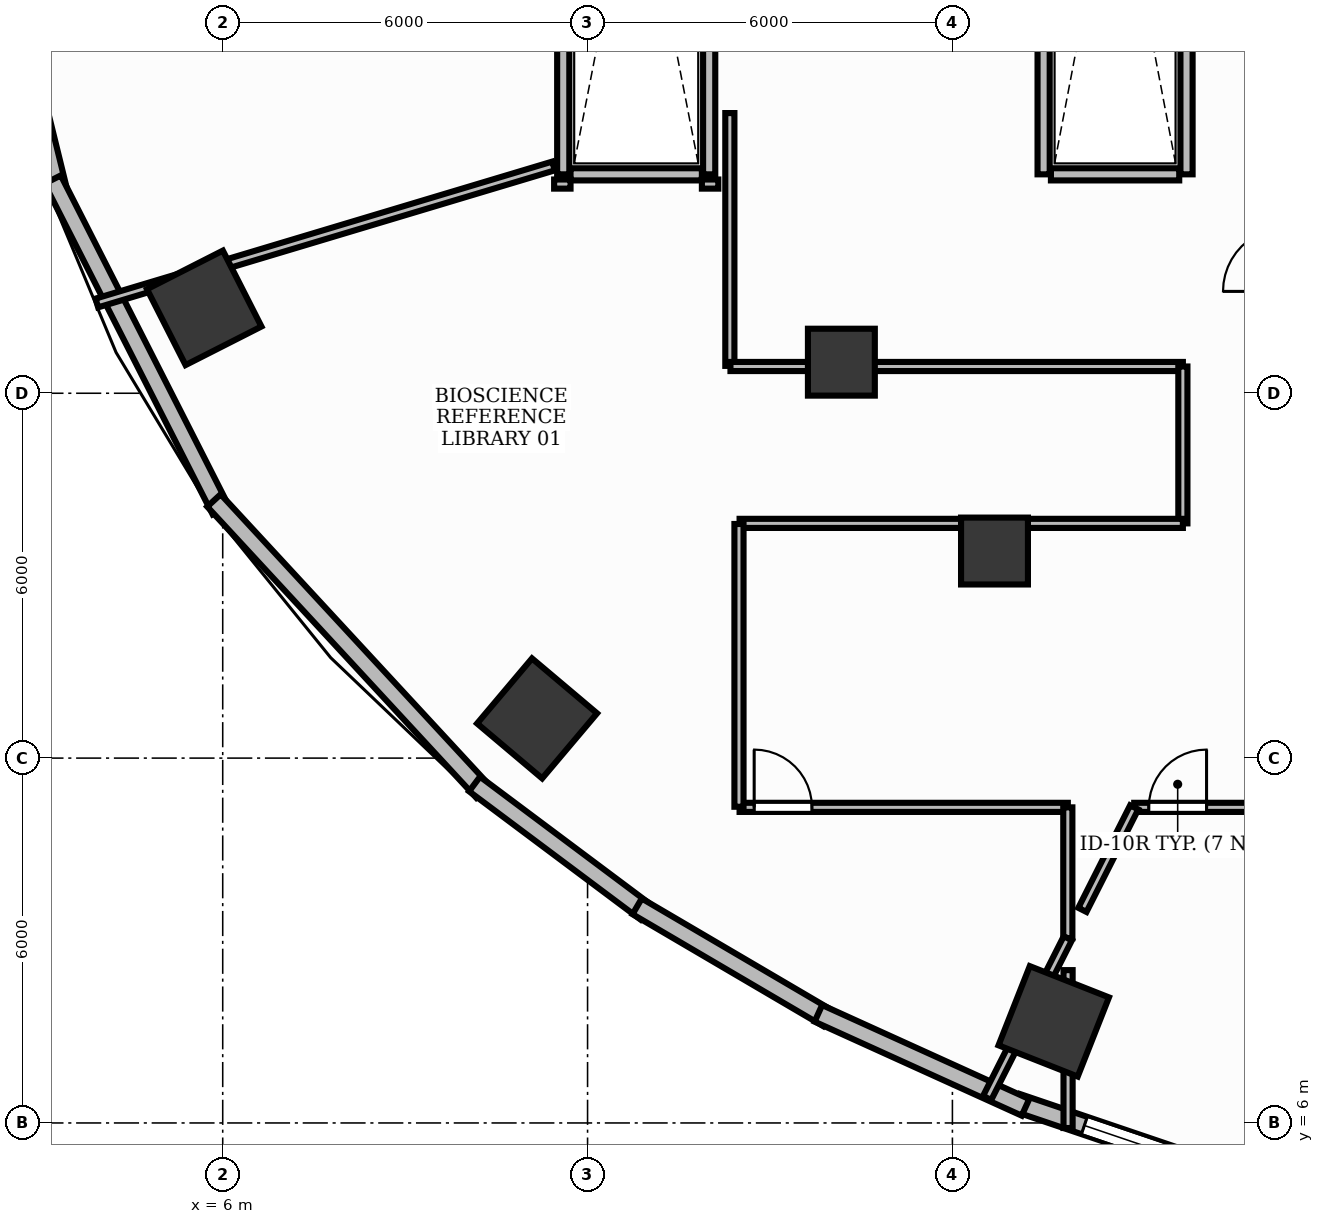
"""IFC4 building model, lengths in metres.
Left out: names, types, materials, properties, quantities, classifications, styles, units other than length and angle.
Written with IfcOpenShell. Run it as: python <this file> out.ifc"""

import sys

from ifc_helpers import new_model, si_unit, direction, frame, frame_2d, origin, origin_2d, place, context, subcontext, project, spatial, rectangle, extrude, element, fill, save


model = new_model("IFC4")
c1 = context("Model", 3, precision=1e-05, world=origin(), true_north=direction((0.0, 1.0)))
c2 = subcontext(c1, "Body", "Model", "MODEL_VIEW")
j1 = project(units=[si_unit("LENGTHUNIT", "METRE"), si_unit("PLANEANGLEUNIT", "RADIAN")], contexts=[c1])
p1 = place(None, origin())
s1 = spatial("IfcSite", under=j1, at=p1, CompositionType="ELEMENT")
p2 = place(p1, origin())
s2 = spatial("IfcBuilding", under=s1, at=p2, CompositionType="ELEMENT")
p3 = place(p2, frame((0.0, 0.0, 20.4)))
s3 = spatial("IfcBuildingStorey", under=s2, at=p3, CompositionType="ELEMENT", Elevation=20.4)
p4 = place(p3, frame((5.696, 19.404, -0.0), z_axis=(0.0, 0.0, 1.0), x_axis=(-0.453057191132, 0.891481453292, 0.0)))
e1 = element("IfcColumn", 1, at=p4, inside=s3, PredefinedType="COLUMN", context=c2, shape_type="SweptSolid", body=[
    extrude(rectangle(XDim=1.4, YDim=1.4, at=origin_2d()), origin(), (0.0, 0.0, 1.0), 5.101),
])
p5 = place(p3, frame((16.174, 18.511, -0.0), z_axis=(0.0, 0.0, 1.0), x_axis=(1.0, 0.0, 0.0)))
e2 = element("IfcColumn", 2, at=p5, inside=s3, PredefinedType="COLUMN", context=c2, shape_type="SweptSolid", body=[
    extrude(rectangle(XDim=1.1, YDim=1.1, at=origin_2d()), origin(), (0.0, 0.0, 1.0), 5.101),
])
p6 = place(p3, frame((11.17, 12.653, -0.0), z_axis=(0.0, 0.0, 1.0), x_axis=(-0.764246456939, 0.644924300253, 0.0)))
e3 = element("IfcColumn", 3, at=p6, inside=s3, PredefinedType="COLUMN", context=c2, shape_type="SweptSolid", body=[
    extrude(rectangle(XDim=1.4, YDim=1.4, at=origin_2d()), origin(), (0.0, 0.0, 1.0), 5.101),
])
p7 = place(p3, frame((18.692, 15.405, -0.0), z_axis=(0.0, 0.0, 1.0), x_axis=(1.0, 0.0, 0.0)))
e4 = element("IfcColumn", 4, at=p7, inside=s3, PredefinedType="COLUMN", context=c2, shape_type="SweptSolid", body=[
    extrude(rectangle(XDim=1.1, YDim=1.1, at=origin_2d()), origin(), (0.0, 0.0, 1.0), 5.101),
])
p8 = place(p3, frame((19.667, 7.671, -0.0), z_axis=(0.0, 0.0, 1.0), x_axis=(-0.930225540858, 0.366988341962, 0.0)))
e5 = element("IfcColumn", 5, at=p8, inside=s3, PredefinedType="COLUMN", context=c2, shape_type="SweptSolid", body=[
    extrude(rectangle(XDim=1.4, YDim=1.4, at=origin_2d()), origin(), (0.0, 0.0, 1.0), 5.101),
])
p9 = place(p3, frame((2.571, 24.266, 0.0), z_axis=(0.0, 0.0, 1.0), x_axis=(0.238522035896, -0.971137085273, 0.0)))
e6 = element("IfcWall", 6, at=p9, inside=s3, PredefinedType="STANDARD", context=c2, shape_type="SweptSolid", body=[
    extrude(rectangle(XDim=2.993, YDim=0.3, at=frame_2d((1.497, 0.0))), origin(), (0.0, 0.0, 1.0), 5.1),
])
p10 = place(p3, frame((19.065, 6.333, 0.0), z_axis=(0.0, 0.0, 1.0), x_axis=(0.947034337234, -0.321132315564, 0.0)))
e7 = element("IfcWall", 7, at=p10, inside=s3, PredefinedType="STANDARD", context=c2, shape_type="SweptSolid", body=[
    extrude(rectangle(XDim=3.79, YDim=0.3, at=frame_2d((1.895, 0.0))), origin(), (0.0, 0.0, 1.0), 4.67),
])
p11 = place(p10, frame((1.166, 0.0, 1.5)))
e8 = element("IfcOpeningElement", 8, at=p11, cuts=e7, PredefinedType="OPENING", context=c2, shape_type="SweptSolid", body=[
    extrude(rectangle(XDim=2.4, YDim=1.2, at=frame_2d((1.2, 0.6))), frame((0.0, 0.165, 0.0), z_axis=(0.0, -1.0, 0.0), x_axis=(1.0, 0.0, 0.0)), (0.0, 0.0, 1.0), 0.33),
])
p12 = place(p3, frame((3.204, 21.514, 0.0), z_axis=(0.0, 0.0, 1.0), x_axis=(0.453093111502, -0.891463197395, 0.0)))
e9 = element("IfcWall", 9, at=p12, inside=s3, PredefinedType="STANDARD", context=c2, shape_type="SweptSolid", body=[
    extrude(rectangle(XDim=6.102, YDim=0.3, at=frame_2d((3.051, 0.0))), origin(), (0.0, 0.0, 1.0), 5.1),
])
p13 = place(p3, frame((5.856, 16.236, 0.0), z_axis=(0.0, 0.0, 1.0), x_axis=(0.678724966684, -0.734392551433, 0.0)))
e10 = element("IfcWall", 10, at=p13, inside=s3, PredefinedType="STANDARD", context=c2, shape_type="SweptSolid", body=[
    extrude(rectangle(XDim=6.517, YDim=0.3, at=frame_2d((3.259, 0.0))), origin(), (0.0, 0.0, 1.0), 5.1),
])
p14 = place(p3, frame((10.142, 11.573, 0.0), z_axis=(0.0, 0.0, 1.0), x_axis=(0.800823020995, -0.598901067827, 0.0)))
e11 = element("IfcWall", 11, at=p14, inside=s3, PredefinedType="STANDARD", context=c2, shape_type="SweptSolid", body=[
    extrude(rectangle(XDim=3.521, YDim=0.3, at=frame_2d((1.76, 0.0))), origin(), (0.0, 0.0, 1.0), 5.1),
])
p15 = place(p3, frame((12.815, 9.562, 0.0), z_axis=(0.0, 0.0, 1.0), x_axis=(0.8624654944, -0.506115867139, 0.0)))
e12 = element("IfcWall", 12, at=p15, inside=s3, PredefinedType="STANDARD", context=c2, shape_type="SweptSolid", body=[
    extrude(rectangle(XDim=3.635, YDim=0.3, at=frame_2d((1.818, 0.0))), origin(), (0.0, 0.0, 1.0), 5.1),
])
p16 = place(p3, frame((15.796, 7.802, 0.0), z_axis=(0.0, 0.0, 1.0), x_axis=(0.910623406862, -0.413237233166, 0.0)))
e13 = element("IfcWall", 13, at=p16, inside=s3, PredefinedType="STANDARD", context=c2, shape_type="SweptSolid", body=[
    extrude(rectangle(XDim=3.74, YDim=0.3, at=frame_2d((1.87, 0.0))), origin(), (0.0, 0.0, 1.0), 5.1),
])
for number, where, z_axis, x_axis in (
    (14, (11.6, 21.6, 0.0), (0.0, 0.0, 1.0), (0.0, 1.0, 0.0)),
    (15, (14.0, 21.6, 0.0), (0.0, 0.0, 1.0), (0.0, 1.0, 0.0)),
):
    element("IfcWall", number, at=place(p3, frame(where, z_axis=z_axis, x_axis=x_axis)), inside=s3, PredefinedType="PARTITIONING", context=c2, shape_type="SweptSolid", body=[
        extrude(rectangle(XDim=10.8, YDim=0.2, at=frame_2d((5.4, 0.0))), origin(), (0.0, 0.0, 1.0), 4.11),
    ])
p17 = place(p3, frame((11.72, 21.6, 0.0), z_axis=(0.0, 0.0, 1.0), x_axis=(1.0, 0.0, 0.0)))
e16 = element("IfcWall", 16, at=p17, inside=s3, PredefinedType="PARTITIONING", context=c2, shape_type="SweptSolid", body=[
    extrude(rectangle(XDim=2.16, YDim=0.2, at=frame_2d((1.08, 0.0))), origin(), (0.0, 0.0, 1.0), 4.11),
])
for number, where, z_axis, x_axis in (
    (17, (19.5, 21.6, 0.0), (0.0, 0.0, 1.0), (0.0, 1.0, 0.0)),
    (18, (21.85, 21.6, 0.0), (0.0, 0.0, 1.0), (0.0, 1.0, 0.0)),
):
    element("IfcWall", number, at=place(p3, frame(where, z_axis=z_axis, x_axis=x_axis)), inside=s3, PredefinedType="PARTITIONING", context=c2, shape_type="SweptSolid", body=[
        extrude(rectangle(XDim=10.8, YDim=0.2, at=frame_2d((5.4, 0.0))), origin(), (0.0, 0.0, 1.0), 4.11),
    ])
p18 = place(p3, frame((19.62, 21.6, 0.0), z_axis=(0.0, 0.0, 1.0), x_axis=(1.0, 0.0, 0.0)))
e19 = element("IfcWall", 19, at=p18, inside=s3, PredefinedType="PARTITIONING", context=c2, shape_type="SweptSolid", body=[
    extrude(rectangle(XDim=2.11, YDim=0.2, at=frame_2d((1.055, 0.0))), origin(), (0.0, 0.0, 1.0), 4.11),
])
p19 = place(p3, frame((14.5, 11.19, 0.0), z_axis=(0.0, 0.0, 1.0), x_axis=(1.0, 0.0, 0.0)))
e20 = element("IfcWall", 20, at=p19, inside=s3, PredefinedType="PARTITIONING", context=c2, shape_type="SweptSolid", body=[
    extrude(rectangle(XDim=5.398, YDim=0.15, at=frame_2d((2.699, 0.0))), origin(), (0.0, 0.0, 1.0), 4.11),
])
p20 = place(p19, frame((0.24, 0.0, 0.0)))
e21 = element("IfcOpeningElement", 21, at=p20, cuts=e20, PredefinedType="OPENING", context=c2, shape_type="SweptSolid", body=[
    extrude(rectangle(XDim=0.95, YDim=2.15, at=frame_2d((0.475, 1.075))), frame((0.0, 0.09, 0.0), z_axis=(0.0, -1.0, 0.0), x_axis=(1.0, 0.0, 0.0)), (0.0, 0.0, 1.0), 0.18),
])
p21 = place(p3, frame((20.99, 11.19, 0.0), z_axis=(0.0, 0.0, 1.0), x_axis=(1.0, 0.0, 0.0)))
e22 = element("IfcWall", 22, at=p21, inside=s3, PredefinedType="PARTITIONING", context=c2, shape_type="SweptSolid", body=[
    extrude(rectangle(XDim=9.365, YDim=0.15, at=frame_2d((4.683, 0.0))), origin(), (0.0, 0.0, 1.0), 4.11),
])
p22 = place(p21, frame((0.24, 0.0, 0.0)))
e23 = element("IfcOpeningElement", 23, at=p22, cuts=e22, PredefinedType="OPENING", context=c2, shape_type="SweptSolid", body=[
    extrude(rectangle(XDim=0.95, YDim=2.15, at=frame_2d((0.475, 1.075))), frame((0.0, 0.09, 0.0), z_axis=(0.0, -1.0, 0.0), x_axis=(1.0, 0.0, 0.0)), (0.0, 0.0, 1.0), 0.18),
])
p23 = place(p3, frame((3.93, 19.484, 0.0), z_axis=(0.0, 0.0, 1.0), x_axis=(0.957822857275, 0.287359311806, 0.0)))
e24 = element("IfcWall", 24, at=p23, inside=s3, PredefinedType="PARTITIONING", context=c2, shape_type="SweptSolid", body=[
    extrude(rectangle(XDim=7.841, YDim=0.15, at=frame_2d((3.92, 0.0))), origin(), (0.0, 0.0, 1.0), 4.11),
])
for number, where, z_axis, x_axis in (
    (25, (11.45, 21.44, 0.0), (0.0, 0.0, 1.0), (1.0, 0.0, 0.0)),
    (26, (13.88, 21.44, 0.0), (0.0, 0.0, 1.0), (1.0, 0.0, 0.0)),
):
    element("IfcWall", number, at=place(p3, frame(where, z_axis=z_axis, x_axis=x_axis)), inside=s3, PredefinedType="PARTITIONING", context=c2, shape_type="SweptSolid", body=[
        extrude(rectangle(XDim=0.27, YDim=0.15, at=frame_2d((0.135, 0.0))), origin(), (0.0, 0.0, 1.0), 4.11),
    ])
p24 = place(p3, frame((14.34, 22.608, 0.0), z_axis=(0.0, 0.0, 1.0), x_axis=(0.0, -1.0, 0.0)))
e27 = element("IfcWall", 27, at=p24, inside=s3, PredefinedType="PARTITIONING", context=c2, shape_type="SweptSolid", body=[
    extrude(rectangle(XDim=4.158, YDim=0.15, at=frame_2d((2.079, 0.0))), origin(), (0.0, 0.0, 1.0), 4.11),
])
p25 = place(p3, frame((14.35, 18.44, 0.0), z_axis=(0.0, 0.0, 1.0), x_axis=(1.0, 0.0, 0.0)))
e28 = element("IfcWall", 28, at=p25, inside=s3, PredefinedType="PARTITIONING", context=c2, shape_type="SweptSolid", body=[
    extrude(rectangle(XDim=7.44, YDim=0.15, at=frame_2d((3.72, 0.0))), origin(), (0.0, 0.0, 1.0), 4.11),
])
p26 = place(p3, frame((21.79, 18.44, 0.0), z_axis=(0.0, 0.0, 1.0), x_axis=(0.0, -1.0, 0.0)))
e29 = element("IfcWall", 29, at=p26, inside=s3, PredefinedType="PARTITIONING", context=c2, shape_type="SweptSolid", body=[
    extrude(rectangle(XDim=2.58, YDim=0.15, at=frame_2d((1.29, 0.0))), origin(), (0.0, 0.0, 1.0), 4.11),
])
p27 = place(p3, frame((21.79, 15.86, 0.0), z_axis=(0.0, 0.0, 1.0), x_axis=(-1.0, 0.0, 0.0)))
e30 = element("IfcWall", 30, at=p27, inside=s3, PredefinedType="PARTITIONING", context=c2, shape_type="SweptSolid", body=[
    extrude(rectangle(XDim=7.29, YDim=0.15, at=frame_2d((3.645, 0.0))), origin(), (0.0, 0.0, 1.0), 4.11),
])
p28 = place(p3, frame((14.49, 15.85, 0.0), z_axis=(0.0, 0.0, 1.0), x_axis=(0.0, -1.0, 0.0)))
e31 = element("IfcWall", 31, at=p28, inside=s3, PredefinedType="PARTITIONING", context=c2, shape_type="SweptSolid", body=[
    extrude(rectangle(XDim=4.65, YDim=0.15, at=frame_2d((2.325, 0.0))), origin(), (0.0, 0.0, 1.0), 4.11),
])
p29 = place(p3, frame((19.898, 11.19, 0.0), z_axis=(0.0, 0.0, 1.0), x_axis=(0.0, -1.0, 0.0)))
e32 = element("IfcWall", 32, at=p29, inside=s3, PredefinedType="PARTITIONING", context=c2, shape_type="SweptSolid", body=[
    extrude(rectangle(XDim=2.152, YDim=0.15, at=frame_2d((1.076, 0.0))), origin(), (0.0, 0.0, 1.0), 4.11),
])
p30 = place(p3, frame((19.898, 9.038, 0.0), z_axis=(0.0, 0.0, 1.0), x_axis=(-0.450893955495, -0.892577526548, 0.0)))
e33 = element("IfcWall", 33, at=p30, inside=s3, PredefinedType="PARTITIONING", context=c2, shape_type="SweptSolid", body=[
    extrude(rectangle(XDim=2.942, YDim=0.15, at=frame_2d((1.471, 0.0))), origin(), (0.0, 0.0, 1.0), 4.11),
])
p31 = place(p3, frame((19.902, 5.917, 0.0), z_axis=(0.0, 0.0, 1.0), x_axis=(0.0, 1.0, 0.0)))
e34 = element("IfcWall", 34, at=p31, inside=s3, PredefinedType="PARTITIONING", context=c2, shape_type="SweptSolid", body=[
    extrude(rectangle(XDim=2.597, YDim=0.15, at=frame_2d((1.298, 0.0))), origin(), (0.0, 0.0, 1.0), 4.11),
])
p32 = place(p3, frame((20.138, 9.504, 0.0), z_axis=(0.0, 0.0, 1.0), x_axis=(0.45082897457, 0.892610349306, 0.0)))
e35 = element("IfcWall", 35, at=p32, inside=s3, PredefinedType="PARTITIONING", context=c2, shape_type="SweptSolid", body=[
    extrude(rectangle(XDim=1.889, YDim=0.15, at=frame_2d((0.944, 0.0))), origin(), (0.0, 0.0, 1.0), 4.11),
])
p33 = place(p11, origin())
e36 = element("IfcWindow", 36, at=p33, inside=s3, PartitioningType="DOUBLE_PANEL_HORIZONTAL", PredefinedType="WINDOW", context=c2, shape_type="SweptSolid", body=[
    extrude(rectangle(XDim=2.4, YDim=1.2, at=frame_2d((1.2, 0.6))), frame((0.0, 0.03, 0.0), z_axis=(0.0, -1.0, 0.0), x_axis=(1.0, 0.0, 0.0)), (0.0, 0.0, 1.0), 0.06),
])
fill(e8, e36)
p34 = place(p20, origin())
e37 = element("IfcDoor", 37, at=p34, inside=s3, OperationType="SINGLE_SWING_LEFT", PredefinedType="DOOR", context=c2, shape_type="SweptSolid", body=[
    extrude(rectangle(XDim=0.95, YDim=2.15, at=frame_2d((0.475, 1.075))), frame((0.0, 0.025, 0.0), z_axis=(0.0, -1.0, 0.0), x_axis=(1.0, 0.0, 0.0)), (0.0, 0.0, 1.0), 0.05),
])
fill(e21, e37)
p35 = place(p22, origin())
e38 = element("IfcDoor", 38, at=p35, inside=s3, OperationType="SINGLE_SWING_RIGHT", PredefinedType="DOOR", context=c2, shape_type="SweptSolid", body=[
    extrude(rectangle(XDim=0.95, YDim=2.15, at=frame_2d((0.475, 1.075))), frame((0.0, 0.025, 0.0), z_axis=(0.0, -1.0, 0.0), x_axis=(1.0, 0.0, 0.0)), (0.0, 0.0, 1.0), 0.05),
])
fill(e23, e38)
save(model, sys.argv[1])
